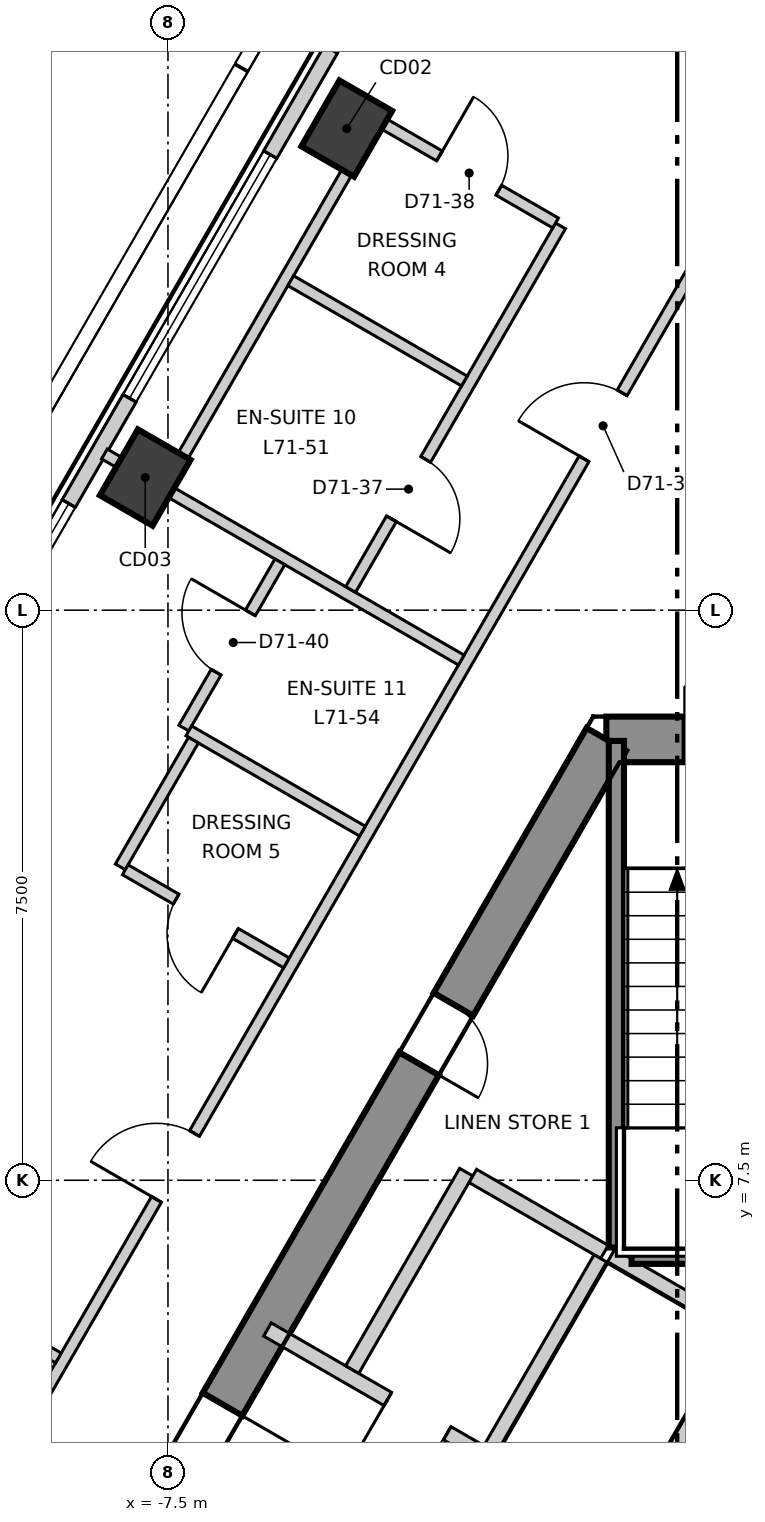
"""IFC4 building model, lengths in metres.
Left out: names, types, materials, properties, quantities, classifications, styles, units other than length and angle.
Written with IfcOpenShell. Run it as: python <this file> out.ifc"""

import sys

from ifc_helpers import new_model, si_unit, direction, frame, frame_2d, origin, origin_2d, place, context, subcontext, project, spatial, polyline, rectangle, outline, extrude, element, fill, save


model = new_model("IFC4")
c1 = context("Model", 3, precision=1e-05, world=origin(), true_north=direction((0.0, 1.0)))
c2 = subcontext(c1, "Body", "Model", "MODEL_VIEW")
j1 = project(units=[si_unit("LENGTHUNIT", "METRE"), si_unit("PLANEANGLEUNIT", "RADIAN")], contexts=[c1])
p1 = place(None, origin())
s1 = spatial("IfcSite", under=j1, at=p1, CompositionType="ELEMENT")
p2 = place(p1, origin())
s2 = spatial("IfcBuilding", under=s1, at=p2, CompositionType="ELEMENT")
p3 = place(p2, frame((0.0, 0.0, 300.7)))
s3 = spatial("IfcBuildingStorey", under=s2, at=p3, CompositionType="ELEMENT", Elevation=300.7)
p4 = place(p3, frame((1.732, 13.3, -0.3), z_axis=(0.0, 0.0, 1.0), x_axis=(-1.0, 0.0, 0.0)))
e1 = element("IfcWall", 1, at=p4, inside=s3, PredefinedType="SHEAR", context=c2, shape_type="SweptSolid", body=[
    extrude(outline(polyline([(-0.173, -0.3), (1.732, -0.3), (3.637, -0.3), (3.291, 0.3), (1.732, 0.3), (0.173, 0.3), (-0.173, -0.3)])), origin(), (0.0, 0.0, 1.0), 3.6),
])
p5 = place(p4, frame((1.032, 0.0, 0.3)))
e2 = element("IfcOpeningElement", 2, at=p5, cuts=e1, PredefinedType="OPENING", context=c2, shape_type="SweptSolid", body=[
    extrude(rectangle(XDim=1.4, YDim=2.1, at=frame_2d((0.7, 1.05))), frame((0.0, 0.31, 0.0), z_axis=(0.0, -1.0, 0.0), x_axis=(1.0, 0.0, 0.0)), (0.0, 0.0, 1.0), 0.62),
])
p6 = place(p3, frame((-1.732, 13.3, -0.3), z_axis=(0.0, 0.0, 1.0), x_axis=(-0.500000539815, -0.866025092122, 0.0)))
e3 = element("IfcWall", 3, at=p6, inside=s3, PredefinedType="SHEAR", context=c2, shape_type="SweptSolid", body=[
    extrude(outline(polyline([(-0.173, -0.3), (1.795, -0.3), (3.763, -0.3), (5.732, -0.3), (7.7, -0.3), (9.668, -0.301), (11.637, -0.301), (13.605, -0.301), (15.573, -0.301), (17.542, -0.301), (19.51, -0.301), (21.478, -0.301), (21.131, 0.3), (19.226, 0.3), (17.321, 0.3), (15.415, 0.3), (13.51, 0.3), (11.605, 0.3), (9.699, 0.3), (7.794, 0.3), (5.889, 0.3), (3.984, 0.3), (2.078, 0.3), (0.173, 0.3), (-0.173, -0.3)])), origin(), (0.0, 0.0, 1.0), 3.6),
])
p7 = place(p6, frame((10.102, 0.0, 0.3)))
e4 = element("IfcOpeningElement", 4, at=p7, cuts=e3, PredefinedType="OPENING", context=c2, shape_type="SweptSolid", body=[
    extrude(rectangle(XDim=1.1, YDim=2.1, at=frame_2d((0.55, 1.05))), frame((0.0, 0.31, 0.0), z_axis=(0.0, -1.0, 0.0), x_axis=(1.0, 0.0, 0.0)), (0.0, 0.0, 1.0), 0.621),
])
p8 = place(p6, frame((16.378, 0.0, 0.3)))
e5 = element("IfcOpeningElement", 5, at=p8, cuts=e3, PredefinedType="OPENING", context=c2, shape_type="SweptSolid", body=[
    extrude(rectangle(XDim=0.9, YDim=2.1, at=frame_2d((0.45, 1.05))), frame((0.0, 0.31, 0.0), z_axis=(0.0, -1.0, 0.0), x_axis=(1.0, 0.0, 0.0)), (0.0, 0.0, 1.0), 0.621),
])
p9 = place(p6, frame((4.026, 0.0, 0.3)))
e6 = element("IfcOpeningElement", 6, at=p9, cuts=e3, PredefinedType="OPENING", context=c2, shape_type="SweptSolid", body=[
    extrude(rectangle(XDim=0.9, YDim=2.1, at=frame_2d((0.45, 1.05))), frame((0.0, 0.31, 0.0), z_axis=(0.0, -1.0, 0.0), x_axis=(1.0, 0.0, 0.0)), (0.0, 0.0, 1.0), 0.621),
])
for number, where, z_axis, x_axis in (
    (7, (-5.148, 21.336, -0.3), (0.0, 0.0, 1.0), (0.5, 0.866, 0.0)),
    (8, (-7.799, 16.745, -0.3), (0.0, 0.0, 1.0), (0.5, 0.866, 0.0)),
):
    element("IfcColumn", number, at=place(p3, frame(where, z_axis=z_axis, x_axis=x_axis)), inside=s3, PredefinedType="COLUMN", context=c2, shape_type="SweptSolid", body=[
        extrude(rectangle(XDim=1.0, YDim=0.8, at=origin_2d()), origin(), (0.0, 0.0, 1.0), 3.6),
    ])
p10 = place(p3, frame((-2.453, 27.405, 0.0), z_axis=(0.0, 0.0, 1.0), x_axis=(-0.500000041859, -0.866025379617, 0.0)))
e9 = element("IfcWall", 9, at=p10, inside=s3, PredefinedType="ELEMENTEDWALL", context=c2, shape_type="SweptSolid", body=[
    extrude(rectangle(XDim=44.994, YDim=0.2, at=frame_2d((22.497, 0.0))), origin(), (0.0, 0.0, 1.0), 3.3),
])
p11 = place(p10, frame((2.103, 0.0, 0.9)))
e10 = element("IfcOpeningElement", 10, at=p11, cuts=e9, PredefinedType="OPENING", context=c2, shape_type="SweptSolid", body=[
    extrude(rectangle(XDim=3.7, YDim=2.2, at=frame_2d((1.85, 1.1))), frame((0.0, 0.11, 0.0), z_axis=(0.0, -1.0, 0.0), x_axis=(1.0, 0.0, 0.0)), (0.0, 0.0, 1.0), 0.22),
])
p12 = place(p10, frame((7.404, 0.0, 0.9)))
e11 = element("IfcOpeningElement", 11, at=p12, cuts=e9, PredefinedType="OPENING", context=c2, shape_type="SweptSolid", body=[
    extrude(rectangle(XDim=3.7, YDim=2.2, at=frame_2d((1.85, 1.1))), frame((0.0, 0.11, 0.0), z_axis=(0.0, -1.0, 0.0), x_axis=(1.0, 0.0, 0.0)), (0.0, 0.0, 1.0), 0.22),
])
p13 = place(p10, frame((12.705, 0.0, 0.9)))
e12 = element("IfcOpeningElement", 12, at=p13, cuts=e9, PredefinedType="OPENING", context=c2, shape_type="SweptSolid", body=[
    extrude(rectangle(XDim=3.7, YDim=2.2, at=frame_2d((1.85, 1.1))), frame((0.0, 0.11, 0.0), z_axis=(0.0, -1.0, 0.0), x_axis=(1.0, 0.0, 0.0)), (0.0, 0.0, 1.0), 0.22),
])
p14 = place(p10, frame((18.006, 0.0, 0.9)))
e13 = element("IfcOpeningElement", 13, at=p14, cuts=e9, PredefinedType="OPENING", context=c2, shape_type="SweptSolid", body=[
    extrude(rectangle(XDim=3.7, YDim=2.2, at=frame_2d((1.85, 1.1))), frame((0.0, 0.11, 0.0), z_axis=(0.0, -1.0, 0.0), x_axis=(1.0, 0.0, 0.0)), (0.0, 0.0, 1.0), 0.22),
])
p15 = place(p10, frame((23.307, 0.0, 0.9)))
e14 = element("IfcOpeningElement", 14, at=p15, cuts=e9, PredefinedType="OPENING", context=c2, shape_type="SweptSolid", body=[
    extrude(rectangle(XDim=3.7, YDim=2.2, at=frame_2d((1.85, 1.1))), frame((0.0, 0.11, 0.0), z_axis=(0.0, -1.0, 0.0), x_axis=(1.0, 0.0, 0.0)), (0.0, 0.0, 1.0), 0.22),
])
p16 = place(p10, frame((28.608, 0.0, 0.9)))
e15 = element("IfcOpeningElement", 15, at=p16, cuts=e9, PredefinedType="OPENING", context=c2, shape_type="SweptSolid", body=[
    extrude(rectangle(XDim=3.7, YDim=2.2, at=frame_2d((1.85, 1.1))), frame((0.0, 0.11, 0.0), z_axis=(0.0, -1.0, 0.0), x_axis=(1.0, 0.0, 0.0)), (0.0, 0.0, 1.0), 0.22),
])
p17 = place(p10, frame((33.909, 0.0, 0.9)))
e16 = element("IfcOpeningElement", 16, at=p17, cuts=e9, PredefinedType="OPENING", context=c2, shape_type="SweptSolid", body=[
    extrude(rectangle(XDim=3.7, YDim=2.2, at=frame_2d((1.85, 1.1))), frame((0.0, 0.11, 0.0), z_axis=(0.0, -1.0, 0.0), x_axis=(1.0, 0.0, 0.0)), (0.0, 0.0, 1.0), 0.22),
])
p18 = place(p10, frame((39.21, 0.0, 0.9)))
e17 = element("IfcOpeningElement", 17, at=p18, cuts=e9, PredefinedType="OPENING", context=c2, shape_type="SweptSolid", body=[
    extrude(rectangle(XDim=3.7, YDim=2.2, at=frame_2d((1.85, 1.1))), frame((0.0, 0.11, 0.0), z_axis=(0.0, -1.0, 0.0), x_axis=(1.0, 0.0, 0.0)), (0.0, 0.0, 1.0), 0.22),
])
p19 = place(p3, frame((-17.679, -10.12, 0.0), z_axis=(0.0, 0.0, 1.0), x_axis=(0.500008955215, 0.866020233427, 0.0)))
e18 = element("IfcWall", 18, at=p19, inside=s3, PredefinedType="PARTITIONING", context=c2, shape_type="SweptSolid", body=[
    extrude(rectangle(XDim=35.357, YDim=0.15, at=frame_2d((17.679, 0.0))), origin(), (0.0, 0.0, 1.0), 3.3),
])
p20 = place(p19, frame((31.307, 0.0, 0.0)))
e19 = element("IfcOpeningElement", 19, at=p20, cuts=e18, PredefinedType="OPENING", context=c2, shape_type="SweptSolid", body=[
    extrude(rectangle(XDim=1.0, YDim=2.1, at=frame_2d((0.5, 1.05))), frame((0.0, 0.085, 0.0), z_axis=(0.0, -1.0, 0.0), x_axis=(1.0, 0.0, 0.0)), (0.0, 0.0, 1.0), 0.17),
])
p21 = place(p19, frame((20.056, 0.0, 0.0)))
e20 = element("IfcOpeningElement", 20, at=p21, cuts=e18, PredefinedType="OPENING", context=c2, shape_type="SweptSolid", body=[
    extrude(rectangle(XDim=1.0, YDim=2.1, at=frame_2d((0.5, 1.05))), frame((0.0, 0.085, 0.0), z_axis=(0.0, -1.0, 0.0), x_axis=(1.0, 0.0, 0.0)), (0.0, 0.0, 1.0), 0.17),
])
p22 = place(p19, frame((13.253, 0.0, 0.0)))
e21 = element("IfcOpeningElement", 21, at=p22, cuts=e18, PredefinedType="OPENING", context=c2, shape_type="SweptSolid", body=[
    extrude(rectangle(XDim=1.0, YDim=2.1, at=frame_2d((0.5, 1.05))), frame((0.0, 0.085, 0.0), z_axis=(0.0, -1.0, 0.0), x_axis=(1.0, 0.0, 0.0)), (0.0, 0.0, 1.0), 0.17),
])
p23 = place(p19, frame((7.653, 0.0, 0.0)))
e22 = element("IfcOpeningElement", 22, at=p23, cuts=e18, PredefinedType="OPENING", context=c2, shape_type="SweptSolid", body=[
    extrude(rectangle(XDim=1.0, YDim=2.1, at=frame_2d((0.5, 1.05))), frame((0.0, 0.085, 0.0), z_axis=(0.0, -1.0, 0.0), x_axis=(1.0, 0.0, 0.0)), (0.0, 0.0, 1.0), 0.17),
])
p24 = place(p19, frame((2.952, 0.0, 0.0)))
e23 = element("IfcOpeningElement", 23, at=p24, cuts=e18, PredefinedType="OPENING", context=c2, shape_type="SweptSolid", body=[
    extrude(rectangle(XDim=1.0, YDim=2.1, at=frame_2d((0.5, 1.05))), frame((0.0, 0.085, 0.0), z_axis=(0.0, -1.0, 0.0), x_axis=(1.0, 0.0, 0.0)), (0.0, 0.0, 1.0), 0.17),
])
p25 = place(p3, frame((-13.637, 7.873, 0.0), z_axis=(0.0, 0.0, 1.0), x_axis=(0.866006352826, -0.500032995777, 0.0)))
e24 = element("IfcWall", 24, at=p25, inside=s3, PredefinedType="PARTITIONING", context=c2, shape_type="SweptSolid", body=[
    extrude(rectangle(XDim=5.422, YDim=0.15, at=frame_2d((2.711, 0.0))), origin(), (0.0, 0.0, 1.0), 2.8),
])
p26 = place(p3, frame((-8.336, 17.055, 0.0), z_axis=(0.0, 0.0, 1.0), x_axis=(0.865995092734, -0.500052496605, 0.0)))
e25 = element("IfcWall", 25, at=p26, inside=s3, PredefinedType="PARTITIONING", context=c2, shape_type="SweptSolid", body=[
    extrude(rectangle(XDim=5.421, YDim=0.15, at=frame_2d((2.711, 0.0))), origin(), (0.0, 0.0, 1.0), 3.3),
])
p27 = place(p3, frame((-5.097, 15.272, 0.0), z_axis=(0.0, 0.0, 1.0), x_axis=(0.499994082372, 0.866028820302, 0.0)))
e26 = element("IfcWall", 26, at=p27, inside=s3, PredefinedType="PARTITIONING", context=c2, shape_type="SweptSolid", body=[
    extrude(rectangle(XDim=5.524, YDim=0.15, at=frame_2d((2.762, 0.0))), origin(), (0.0, 0.0, 1.0), 3.3),
])
p28 = place(p27, frame((1.075, 0.0, 0.0)))
e27 = element("IfcOpeningElement", 27, at=p28, cuts=e26, PredefinedType="OPENING", context=c2, shape_type="SweptSolid", body=[
    extrude(rectangle(XDim=0.9, YDim=2.1, at=frame_2d((0.45, 1.05))), frame((0.0, 0.085, 0.0), z_axis=(0.0, -1.0, 0.0), x_axis=(1.0, 0.0, 0.0)), (0.0, 0.0, 1.0), 0.17),
])
p29 = place(p3, frame((-7.512, 16.666, 0.0), z_axis=(0.0, 0.0, 1.0), x_axis=(0.500050108258, 0.865996471835, 0.0)))
e28 = element("IfcWall", 28, at=p29, inside=s3, PredefinedType="PARTITIONING", context=c2, shape_type="SweptSolid", body=[
    extrude(rectangle(XDim=5.525, YDim=0.15, at=frame_2d((2.763, 0.0))), origin(), (0.0, 0.0, 1.0), 2.6),
])
p30 = place(p3, frame((-7.291, 13.449, 0.0), z_axis=(0.0, 0.0, 1.0), x_axis=(0.500079482444, 0.865979509711, 0.0)))
e29 = element("IfcWall", 29, at=p30, inside=s3, PredefinedType="PARTITIONING", context=c2, shape_type="SweptSolid", body=[
    extrude(rectangle(XDim=2.525, YDim=0.15, at=frame_2d((1.263, 0.0))), origin(), (0.0, 0.0, 1.0), 3.3),
])
p31 = place(p30, frame((0.85, 0.0, 0.0)))
e30 = element("IfcOpeningElement", 30, at=p31, cuts=e29, PredefinedType="OPENING", context=c2, shape_type="SweptSolid", body=[
    extrude(rectangle(XDim=0.9, YDim=2.1, at=frame_2d((0.45, 1.05))), frame((0.0, 0.085, 0.0), z_axis=(0.0, -1.0, 0.0), x_axis=(1.0, 0.0, 0.0)), (0.0, 0.0, 1.0), 0.17),
])
p32 = place(p3, frame((-7.226, 13.412, 0.0), z_axis=(0.0, 0.0, 1.0), x_axis=(0.866065407652, -0.499930704866, 0.0)))
e31 = element("IfcWall", 31, at=p32, inside=s3, PredefinedType="PARTITIONING", context=c2, shape_type="SweptSolid", body=[
    extrude(rectangle(XDim=2.638, YDim=0.15, at=frame_2d((1.319, 0.0))), origin(), (0.0, 0.0, 1.0), 3.3),
])
p33 = place(p3, frame((-8.127, 11.623, 0.0), z_axis=(0.0, 0.0, 1.0), x_axis=(0.499795662447, 0.866143345988, 0.0)))
e32 = element("IfcWall", 32, at=p33, inside=s3, PredefinedType="PARTITIONING", context=c2, shape_type="SweptSolid", body=[
    extrude(rectangle(XDim=1.925, YDim=0.15, at=frame_2d((0.962, 0.0))), origin(), (0.0, 0.0, 1.0), 3.3),
])
p34 = place(p3, frame((-8.062, 11.585, 0.0), z_axis=(0.0, 0.0, 1.0), x_axis=(0.865983065851, -0.500073324283, 0.0)))
e33 = element("IfcWall", 33, at=p34, inside=s3, PredefinedType="PARTITIONING", context=c2, shape_type="SweptSolid", body=[
    extrude(rectangle(XDim=2.449, YDim=0.15, at=frame_2d((1.225, 0.0))), origin(), (0.0, 0.0, 1.0), 3.3),
])
p35 = place(p34, frame((0.774, 0.0, 0.0)))
e34 = element("IfcOpeningElement", 34, at=p35, cuts=e33, PredefinedType="OPENING", context=c2, shape_type="SweptSolid", body=[
    extrude(rectangle(XDim=0.9, YDim=2.1, at=frame_2d((0.45, 1.05))), frame((0.0, 0.085, 0.0), z_axis=(0.0, -1.0, 0.0), x_axis=(1.0, 0.0, 0.0)), (0.0, 0.0, 1.0), 0.17),
])
p36 = place(p3, frame((-4.685, 21.413, 0.0), z_axis=(0.0, 0.0, 1.0), x_axis=(0.866065407652, -0.499930704866, 0.0)))
e35 = element("IfcWall", 35, at=p36, inside=s3, PredefinedType="PARTITIONING", context=c2, shape_type="SweptSolid", body=[
    extrude(rectangle(XDim=2.638, YDim=0.15, at=frame_2d((1.319, 0.0))), origin(), (0.0, 0.0, 1.0), 3.3),
])
p37 = place(p36, frame((0.875, 0.0, 0.0)))
e36 = element("IfcOpeningElement", 36, at=p37, cuts=e35, PredefinedType="OPENING", context=c2, shape_type="SweptSolid", body=[
    extrude(rectangle(XDim=0.9, YDim=2.1, at=frame_2d((0.45, 1.05))), frame((0.0, 0.085, 0.0), z_axis=(0.0, -1.0, 0.0), x_axis=(1.0, 0.0, 0.0)), (0.0, 0.0, 1.0), 0.17),
])
p38 = place(p3, frame((-5.885, 19.335, 0.0), z_axis=(0.0, 0.0, 1.0), x_axis=(0.865881993967, -0.500248310865, 0.0)))
e37 = element("IfcWall", 37, at=p38, inside=s3, PredefinedType="PARTITIONING", context=c2, shape_type="SweptSolid", body=[
    extrude(rectangle(XDim=2.639, YDim=0.15, at=frame_2d((1.319, 0.0))), origin(), (0.0, 0.0, 1.0), 3.3),
])
p39 = place(p3, frame((-6.191, 5.537, 0.0), z_axis=(0.0, 0.0, 1.0), x_axis=(0.866052607023, -0.499952879648, 0.0)))
e38 = element("IfcWall", 38, at=p39, inside=s3, PredefinedType="SOLIDWALL", context=c2, shape_type="SweptSolid", body=[
    extrude(rectangle(XDim=3.332, YDim=0.2, at=frame_2d((1.666, 0.0))), origin(), (0.0, 0.0, 1.0), 3.3),
])
p40 = place(p39, frame((1.83, 0.0, 0.0)))
e39 = element("IfcOpeningElement", 39, at=p40, cuts=e38, PredefinedType="OPENING", context=c2, shape_type="SweptSolid", body=[
    extrude(rectangle(XDim=0.9, YDim=2.1, at=frame_2d((0.45, 1.05))), frame((0.0, 0.11, 0.0), z_axis=(0.0, -1.0, 0.0), x_axis=(1.0, 0.0, 0.0)), (0.0, 0.0, 1.0), 0.22),
])
p41 = place(p3, frame((-5.076, 5.009, 0.0), z_axis=(0.0, 0.0, 1.0), x_axis=(0.50002537861, 0.866010750942, 0.0)))
e40 = element("IfcWall", 40, at=p41, inside=s3, PredefinedType="SOLIDWALL", context=c2, shape_type="SweptSolid", body=[
    extrude(rectangle(XDim=3.0, YDim=0.2, at=frame_2d((1.5, 0.0))), origin(), (0.0, 0.0, 1.0), 3.3),
])
p42 = place(p3, frame((-3.489, 7.557, 0.0), z_axis=(0.0, 0.0, 1.0), x_axis=(0.866010750942, -0.50002537861, 0.0)))
e41 = element("IfcWall", 41, at=p42, inside=s3, PredefinedType="SOLIDWALL", context=c2, shape_type="SweptSolid", body=[
    extrude(rectangle(XDim=2.0, YDim=0.2, at=frame_2d((1.0, 0.0))), origin(), (0.0, 0.0, 1.0), 3.3),
])
p43 = place(p3, frame((-3.257, 3.959, 0.0), z_axis=(0.0, 0.0, 1.0), x_axis=(0.50012328804, 0.865954211699, 0.0)))
e42 = element("IfcWall", 42, at=p43, inside=s3, PredefinedType="SOLIDWALL", context=c2, shape_type="SweptSolid", body=[
    extrude(rectangle(XDim=2.9, YDim=0.2, at=frame_2d((1.45, 0.0))), origin(), (0.0, 0.0, 1.0), 3.3),
])
p44 = place(p3, frame((-1.67, 6.507, 0.0), z_axis=(0.0, 0.0, 1.0), x_axis=(0.865941441609, -0.500145398563, 0.0)))
e43 = element("IfcWall", 43, at=p44, inside=s3, PredefinedType="SOLIDWALL", context=c2, shape_type="SweptSolid", body=[
    extrude(rectangle(XDim=1.815, YDim=0.2, at=frame_2d((0.908, 0.0))), origin(), (0.0, 0.0, 1.0), 3.3),
])
p45 = place(p3, frame((-1.438, 2.909, 0.0), z_axis=(0.0, 0.0, 1.0), x_axis=(0.499829630636, 0.866123744241, 0.0)))
e44 = element("IfcWall", 44, at=p45, inside=s3, PredefinedType="SOLIDWALL", context=c2, shape_type="SweptSolid", body=[
    extrude(rectangle(XDim=2.761, YDim=0.2, at=frame_2d((1.38, 0.0))), origin(), (0.0, 0.0, 1.0), 3.3),
])
p46 = place(p3, frame((-1.4, 6.5, 0.0), z_axis=(0.0, 0.0, 1.0), x_axis=(1.0, 0.0, 0.0)))
e45 = element("IfcWall", 45, at=p46, inside=s3, PredefinedType="SOLIDWALL", context=c2, shape_type="SweptSolid", body=[
    extrude(rectangle(XDim=2.8, YDim=0.2, at=frame_2d((1.4, 0.0))), origin(), (0.0, 0.0, 1.0), 3.3),
])
p47 = place(p3, frame((-1.6, 6.615, 0.0), z_axis=(0.0, 0.0, 1.0), x_axis=(0.0, 1.0, 0.0)))
e46 = element("IfcWall", 46, at=p47, inside=s3, PredefinedType="SOLIDWALL", context=c2, shape_type="SweptSolid", body=[
    extrude(rectangle(XDim=6.665, YDim=0.2, at=frame_2d((3.333, 0.0))), origin(), (0.0, 0.0, 1.0), 3.3),
])
p48 = place(p12, origin())
e47 = element("IfcWindow", 47, at=p48, inside=s3, PartitioningType="SINGLE_PANEL", PredefinedType="WINDOW", context=c2, shape_type="SweptSolid", body=[
    extrude(rectangle(XDim=3.7, YDim=2.2, at=frame_2d((1.85, 1.1))), frame((0.0, 0.03, 0.0), z_axis=(0.0, -1.0, 0.0), x_axis=(1.0, 0.0, 0.0)), (0.0, 0.0, 1.0), 0.06),
])
fill(e11, e47)
p49 = place(p13, origin())
e48 = element("IfcWindow", 48, at=p49, inside=s3, PartitioningType="SINGLE_PANEL", PredefinedType="WINDOW", context=c2, shape_type="SweptSolid", body=[
    extrude(rectangle(XDim=3.7, YDim=2.2, at=frame_2d((1.85, 1.1))), frame((0.0, 0.03, 0.0), z_axis=(0.0, -1.0, 0.0), x_axis=(1.0, 0.0, 0.0)), (0.0, 0.0, 1.0), 0.06),
])
fill(e12, e48)
p50 = place(p40, origin())
e49 = element("IfcDoor", 49, at=p50, inside=s3, OperationType="SINGLE_SWING_LEFT", PredefinedType="DOOR", context=c2, shape_type="SweptSolid", body=[
    extrude(rectangle(XDim=0.9, YDim=2.1, at=frame_2d((0.45, 1.05))), frame((0.0, 0.025, 0.0), z_axis=(0.0, -1.0, 0.0), x_axis=(1.0, 0.0, 0.0)), (0.0, 0.0, 1.0), 0.05),
])
fill(e39, e49)
p51 = place(p20, origin())
e50 = element("IfcDoor", 50, at=p51, inside=s3, OperationType="SINGLE_SWING_RIGHT", PredefinedType="DOOR", context=c2, shape_type="SweptSolid", body=[
    extrude(rectangle(XDim=1.0, YDim=2.1, at=frame_2d((0.5, 1.05))), frame((0.0, 0.025, 0.0), z_axis=(0.0, -1.0, 0.0), x_axis=(1.0, 0.0, 0.0)), (0.0, 0.0, 1.0), 0.05),
])
fill(e19, e50)
p52 = place(p28, origin())
e51 = element("IfcDoor", 51, at=p52, inside=s3, OperationType="SINGLE_SWING_LEFT", PredefinedType="DOOR", context=c2, shape_type="SweptSolid", body=[
    extrude(rectangle(XDim=0.9, YDim=2.1, at=frame_2d((0.45, 1.05))), frame((0.0, 0.025, 0.0), z_axis=(0.0, -1.0, 0.0), x_axis=(1.0, 0.0, 0.0)), (0.0, 0.0, 1.0), 0.05),
])
fill(e27, e51)
p53 = place(p37, origin())
e52 = element("IfcDoor", 52, at=p53, inside=s3, OperationType="SINGLE_SWING_RIGHT", PredefinedType="DOOR", context=c2, shape_type="SweptSolid", body=[
    extrude(rectangle(XDim=0.9, YDim=2.1, at=frame_2d((0.45, 1.05))), frame((0.0, 0.025, 0.0), z_axis=(0.0, -1.0, 0.0), x_axis=(1.0, 0.0, 0.0)), (0.0, 0.0, 1.0), 0.05),
])
fill(e36, e52)
p54 = place(p21, origin())
e53 = element("IfcDoor", 53, at=p54, inside=s3, OperationType="SINGLE_SWING_RIGHT", PredefinedType="DOOR", context=c2, shape_type="SweptSolid", body=[
    extrude(rectangle(XDim=1.0, YDim=2.1, at=frame_2d((0.5, 1.05))), frame((0.0, 0.025, 0.0), z_axis=(0.0, -1.0, 0.0), x_axis=(1.0, 0.0, 0.0)), (0.0, 0.0, 1.0), 0.05),
])
fill(e20, e53)
p55 = place(p31, origin())
e54 = element("IfcDoor", 54, at=p55, inside=s3, OperationType="SINGLE_SWING_LEFT", PredefinedType="DOOR", context=c2, shape_type="SweptSolid", body=[
    extrude(rectangle(XDim=0.9, YDim=2.1, at=frame_2d((0.45, 1.05))), frame((0.0, 0.025, 0.0), z_axis=(0.0, -1.0, 0.0), x_axis=(1.0, 0.0, 0.0)), (0.0, 0.0, 1.0), 0.05),
])
fill(e30, e54)
p56 = place(p35, origin())
e55 = element("IfcDoor", 55, at=p56, inside=s3, OperationType="SINGLE_SWING_RIGHT", PredefinedType="DOOR", context=c2, shape_type="SweptSolid", body=[
    extrude(rectangle(XDim=0.9, YDim=2.1, at=frame_2d((0.45, 1.05))), frame((0.0, 0.025, 0.0), z_axis=(0.0, -1.0, 0.0), x_axis=(1.0, 0.0, 0.0)), (0.0, 0.0, 1.0), 0.05),
])
fill(e34, e55)
p57 = place(p7, origin())
e56 = element("IfcDoor", 56, at=p57, inside=s3, OperationType="SINGLE_SWING_RIGHT", PredefinedType="DOOR", context=c2, shape_type="SweptSolid", body=[
    extrude(rectangle(XDim=1.1, YDim=2.1, at=frame_2d((0.55, 1.05))), frame((0.0, 0.025, 0.0), z_axis=(0.0, -1.0, 0.0), x_axis=(1.0, 0.0, 0.0)), (0.0, 0.0, 1.0), 0.05),
])
fill(e4, e56)
p58 = place(p9, origin())
e57 = element("IfcDoor", 57, at=p58, inside=s3, OperationType="SINGLE_SWING_LEFT", PredefinedType="DOOR", context=c2, shape_type="SweptSolid", body=[
    extrude(rectangle(XDim=0.9, YDim=2.1, at=frame_2d((0.45, 1.05))), frame((0.0, 0.025, 0.0), z_axis=(0.0, -1.0, 0.0), x_axis=(1.0, 0.0, 0.0)), (0.0, 0.0, 1.0), 0.05),
])
fill(e6, e57)
save(model, sys.argv[1])
